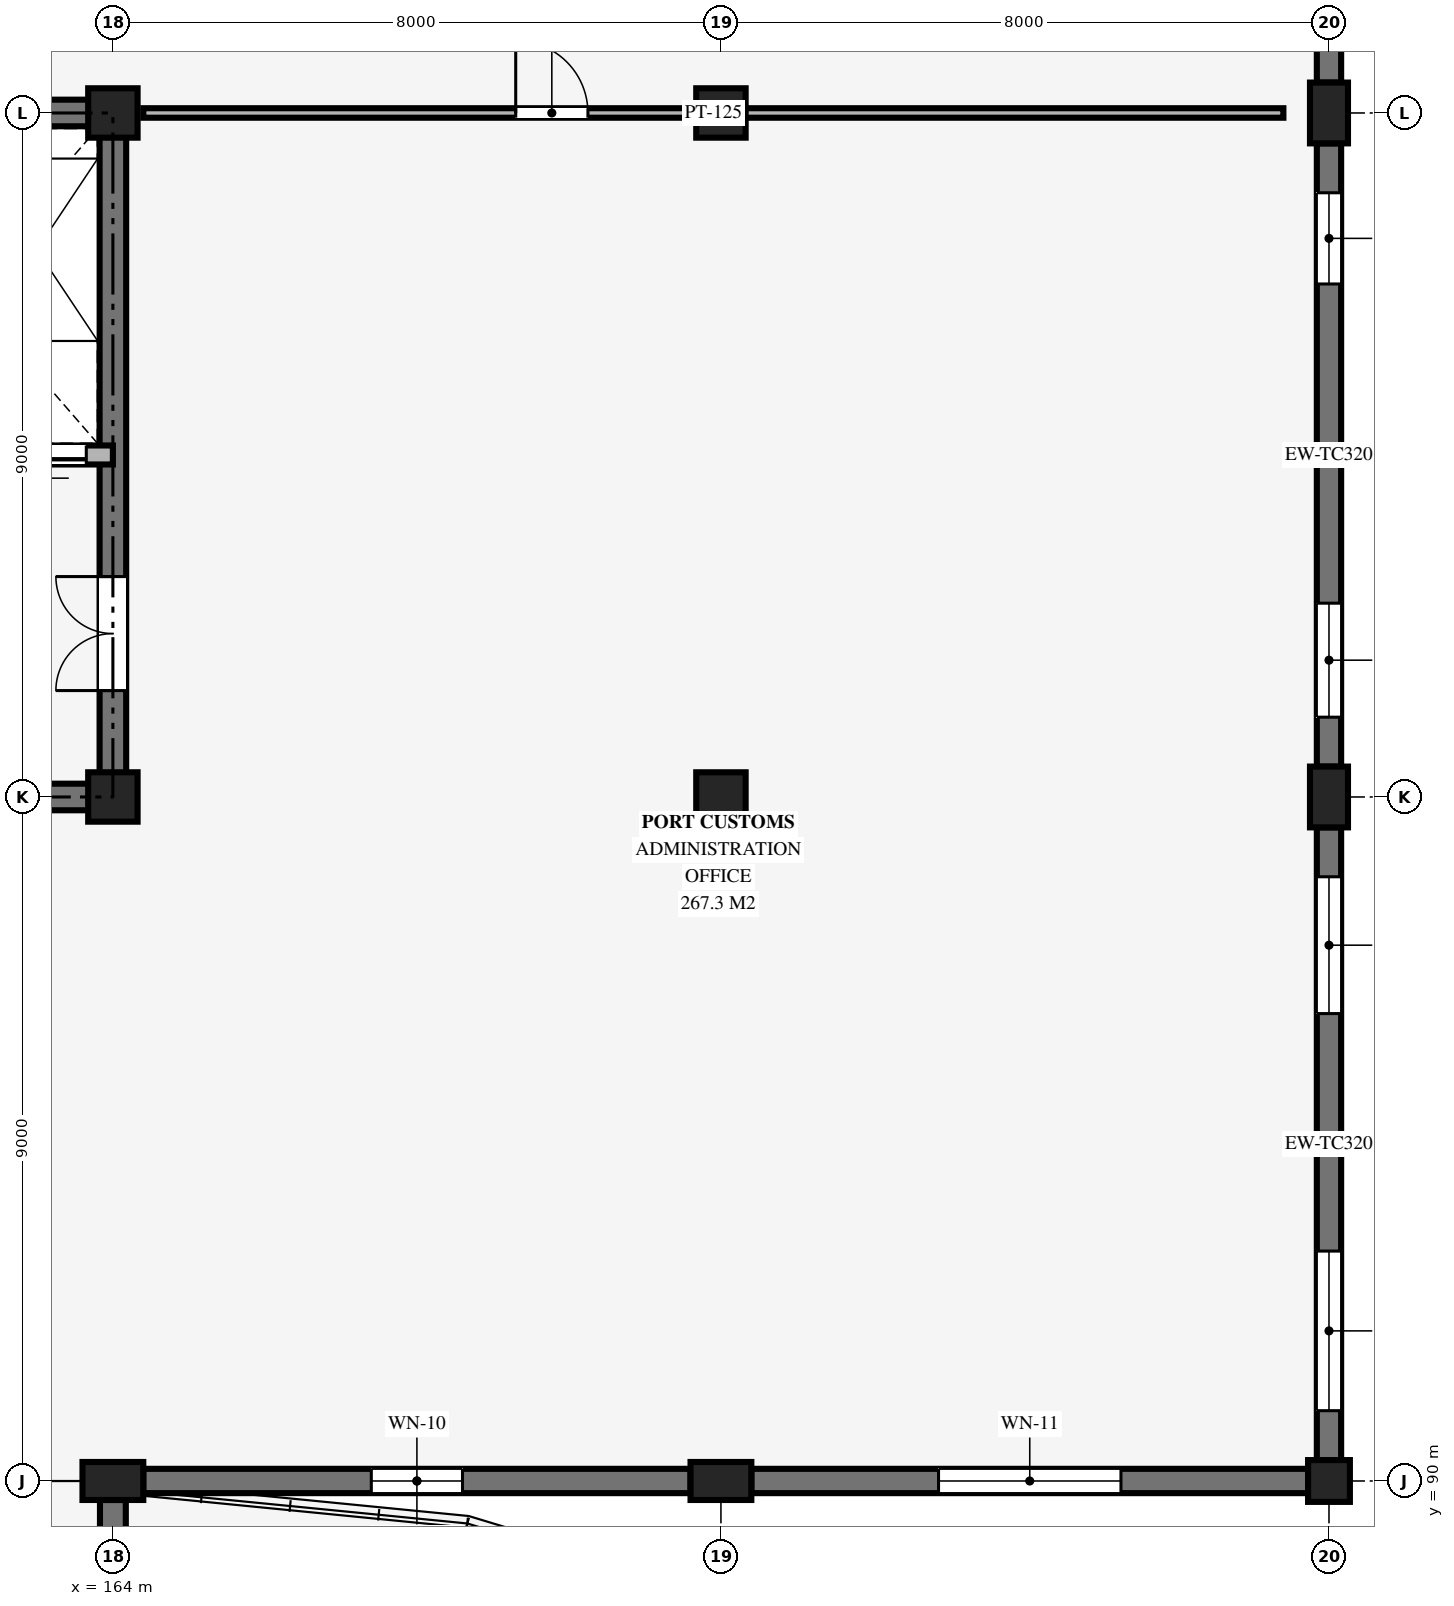
"""IFC4 building model, lengths in metres.
Left out: names, types, materials, properties, quantities, classifications, styles, units other than length and angle.
Written with IfcOpenShell. Run it as: python <this file> out.ifc"""

import sys

from ifc_helpers import new_model, si_unit, direction, frame, frame_2d, origin, origin_2d, place, context, subcontext, project, spatial, rectangle, extrude, element, fill, save


model = new_model("IFC4")
c1 = context("Model", 3, precision=1e-05, world=origin(), true_north=direction((0.0, 1.0)))
c2 = subcontext(c1, "Body", "Model", "MODEL_VIEW")
j1 = project(units=[si_unit("LENGTHUNIT", "METRE"), si_unit("PLANEANGLEUNIT", "RADIAN")], contexts=[c1])
p1 = place(None, origin())
s1 = spatial("IfcSite", under=j1, at=p1, CompositionType="ELEMENT")
p2 = place(p1, origin())
s2 = spatial("IfcBuilding", under=s1, at=p2, CompositionType="ELEMENT")
p3 = place(p2, frame((0.0, 0.0, 15.0)))
s3 = spatial("IfcBuildingStorey", under=s2, at=p3, CompositionType="ELEMENT", Elevation=15.0)
p4 = place(p3, frame((164.0, 90.0, 0.0), z_axis=(0.0, 0.0, 1.0), x_axis=(0.0, 1.0, 0.0)))
e1 = element("IfcColumn", 1, at=p4, inside=s3, PredefinedType="PILASTER", context=c2, shape_type="SweptSolid", body=[
    extrude(rectangle(XDim=0.5, YDim=0.8, at=origin_2d()), origin(), (0.0, 0.0, 1.0), 4.34),
])
for number, where, z_axis, x_axis in (
    (2, (164.0, 99.0, 0.0), (0.0, 0.0, 1.0), (1.0, 0.0, 0.0)),
    (3, (164.0, 108.0, 0.0), (0.0, 0.0, 1.0), (1.0, 0.0, 0.0)),
):
    element("IfcColumn", number, at=place(p3, frame(where, z_axis=z_axis, x_axis=x_axis)), inside=s3, PredefinedType="COLUMN", context=c2, shape_type="SweptSolid", body=[
        extrude(rectangle(XDim=0.65, YDim=0.65, at=origin_2d()), origin(), (0.0, 0.0, 1.0), 4.34),
    ])
p5 = place(p3, frame((172.0, 90.0, 0.0), z_axis=(0.0, 0.0, 1.0), x_axis=(0.0, 1.0, 0.0)))
e4 = element("IfcColumn", 4, at=p5, inside=s3, PredefinedType="PILASTER", context=c2, shape_type="SweptSolid", body=[
    extrude(rectangle(XDim=0.5, YDim=0.8, at=origin_2d()), origin(), (0.0, 0.0, 1.0), 4.34),
])
for number, where, z_axis, x_axis in (
    (5, (172.0, 99.0, 0.0), (0.0, 0.0, 1.0), (1.0, 0.0, 0.0)),
    (6, (172.0, 108.0, 0.0), (0.0, 0.0, 1.0), (1.0, 0.0, 0.0)),
):
    element("IfcColumn", number, at=place(p3, frame(where, z_axis=z_axis, x_axis=x_axis)), inside=s3, PredefinedType="COLUMN", context=c2, shape_type="SweptSolid", body=[
        extrude(rectangle(XDim=0.65, YDim=0.65, at=origin_2d()), origin(), (0.0, 0.0, 1.0), 4.34),
    ])
p6 = place(p3, frame((180.0, 90.0, 0.0), z_axis=(0.0, 0.0, 1.0), x_axis=(1.0, 0.0, 0.0)))
e7 = element("IfcColumn", 7, at=p6, inside=s3, PredefinedType="COLUMN", context=c2, shape_type="SweptSolid", body=[
    extrude(rectangle(XDim=0.55, YDim=0.55, at=origin_2d()), origin(), (0.0, 0.0, 1.0), 4.34),
])
for number, where, z_axis, x_axis in (
    (8, (180.0, 99.0, 0.0), (0.0, 0.0, 1.0), (1.0, 0.0, 0.0)),
    (9, (180.0, 108.0, 0.0), (0.0, 0.0, 1.0), (1.0, 0.0, 0.0)),
):
    element("IfcColumn", number, at=place(p3, frame(where, z_axis=z_axis, x_axis=x_axis)), inside=s3, PredefinedType="PILASTER", context=c2, shape_type="SweptSolid", body=[
        extrude(rectangle(XDim=0.5, YDim=0.8, at=origin_2d()), origin(), (0.0, 0.0, 1.0), 4.34),
    ])
p7 = place(p3, frame((164.0, 78.225, 0.0), z_axis=(0.0, 0.0, 1.0), x_axis=(0.0, 1.0, 0.0)))
e10 = element("IfcWall", 10, at=p7, inside=s3, PredefinedType="SOLIDWALL", context=c2, shape_type="SweptSolid", body=[
    extrude(rectangle(XDim=11.525, YDim=0.34, at=frame_2d((5.762, 0.0))), origin(), (0.0, 0.0, 1.0), 4.24),
])
p8 = place(p7, frame((4.813, 0.0, 0.0)))
e11 = element("IfcOpeningElement", 11, at=p8, cuts=e10, PredefinedType="OPENING", context=c2, shape_type="SweptSolid", body=[
    extrude(rectangle(XDim=1.9, YDim=2.2, at=frame_2d((0.95, 1.1))), frame((0.0, 0.18, 0.0), z_axis=(0.0, -1.0, 0.0), x_axis=(1.0, 0.0, 0.0)), (0.0, 0.0, 1.0), 0.36),
])
p9 = place(p3, frame((180.0, 90.275, 0.0), z_axis=(0.0, 0.0, 1.0), x_axis=(0.0, 1.0, 0.0)))
e12 = element("IfcWall", 12, at=p9, inside=s3, PredefinedType="SOLIDWALL", context=c2, shape_type="SweptSolid", body=[
    extrude(rectangle(XDim=8.325, YDim=0.32, at=frame_2d((4.163, 0.0))), origin(), (0.0, 0.0, 1.0), 4.24),
])
p10 = place(p9, frame((0.65, 0.0, 0.95)))
e13 = element("IfcOpeningElement", 13, at=p10, cuts=e12, PredefinedType="OPENING", context=c2, shape_type="SweptSolid", body=[
    extrude(rectangle(XDim=2.1, YDim=2.2, at=frame_2d((1.05, 1.1))), frame((0.0, 0.17, 0.0), z_axis=(0.0, -1.0, 0.0), x_axis=(1.0, 0.0, 0.0)), (0.0, 0.0, 1.0), 0.34),
])
p11 = place(p9, frame((5.875, 0.0, 0.95)))
e14 = element("IfcOpeningElement", 14, at=p11, cuts=e12, PredefinedType="OPENING", context=c2, shape_type="SweptSolid", body=[
    extrude(rectangle(XDim=1.8, YDim=2.2, at=frame_2d((0.9, 1.1))), frame((0.0, 0.17, 0.0), z_axis=(0.0, -1.0, 0.0), x_axis=(1.0, 0.0, 0.0)), (0.0, 0.0, 1.0), 0.34),
])
p12 = place(p3, frame((180.0, 99.4, 0.0), z_axis=(0.0, 0.0, 1.0), x_axis=(0.0, 1.0, 0.0)))
e15 = element("IfcWall", 15, at=p12, inside=s3, PredefinedType="SOLIDWALL", context=c2, shape_type="SweptSolid", body=[
    extrude(rectangle(XDim=8.2, YDim=0.32, at=frame_2d((4.1, 0.0))), origin(), (0.0, 0.0, 1.0), 4.24),
])
p13 = place(p12, frame((0.65, 0.0, 0.95)))
e16 = element("IfcOpeningElement", 16, at=p13, cuts=e15, PredefinedType="OPENING", context=c2, shape_type="SweptSolid", body=[
    extrude(rectangle(XDim=1.5, YDim=2.2, at=frame_2d((0.75, 1.1))), frame((0.0, 0.17, 0.0), z_axis=(0.0, -1.0, 0.0), x_axis=(1.0, 0.0, 0.0)), (0.0, 0.0, 1.0), 0.34),
])
p14 = place(p12, frame((6.35, 0.0, 0.95)))
e17 = element("IfcOpeningElement", 17, at=p14, cuts=e15, PredefinedType="OPENING", context=c2, shape_type="SweptSolid", body=[
    extrude(rectangle(XDim=1.2, YDim=2.2, at=frame_2d((0.6, 1.1))), frame((0.0, 0.17, 0.0), z_axis=(0.0, -1.0, 0.0), x_axis=(1.0, 0.0, 0.0)), (0.0, 0.0, 1.0), 0.34),
])
p15 = place(p3, frame((180.0, 108.4, 0.0), z_axis=(0.0, 0.0, 1.0), x_axis=(0.0, 1.0, 0.0)))
e18 = element("IfcWall", 18, at=p15, inside=s3, PredefinedType="SOLIDWALL", context=c2, shape_type="SweptSolid", body=[
    extrude(rectangle(XDim=8.2, YDim=0.32, at=frame_2d((4.1, 0.0))), origin(), (0.0, 0.0, 1.0), 4.24),
])
p16 = place(p15, frame((0.65, 0.0, 0.95)))
e19 = element("IfcOpeningElement", 19, at=p16, cuts=e18, PredefinedType="OPENING", context=c2, shape_type="SweptSolid", body=[
    extrude(rectangle(XDim=2.4, YDim=1.8, at=frame_2d((1.2, 0.9))), frame((0.0, 0.17, 0.0), z_axis=(0.0, -1.0, 0.0), x_axis=(1.0, 0.0, 0.0)), (0.0, 0.0, 1.0), 0.34),
])
p17 = place(p15, frame((5.45, 0.0, 0.95)))
e20 = element("IfcOpeningElement", 20, at=p17, cuts=e18, PredefinedType="OPENING", context=c2, shape_type="SweptSolid", body=[
    extrude(rectangle(XDim=2.1, YDim=1.8, at=frame_2d((1.05, 0.9))), frame((0.0, 0.17, 0.0), z_axis=(0.0, -1.0, 0.0), x_axis=(1.0, 0.0, 0.0)), (0.0, 0.0, 1.0), 0.34),
])
p18 = place(p3, frame((171.6, 90.0, 0.0), z_axis=(0.0, 0.0, 1.0), x_axis=(-1.0, 0.0, 0.0)))
e21 = element("IfcWall", 21, at=p18, inside=s3, PredefinedType="SOLIDWALL", context=c2, shape_type="SweptSolid", body=[
    extrude(rectangle(XDim=7.2, YDim=0.32, at=frame_2d((3.6, 0.0))), origin(), (0.0, 0.0, 1.0), 4.24),
])
p19 = place(p18, frame((3.0, 0.0, 1.0)))
e22 = element("IfcOpeningElement", 22, at=p19, cuts=e21, PredefinedType="OPENING", context=c2, shape_type="SweptSolid", body=[
    extrude(rectangle(XDim=1.2, YDim=1.8, at=frame_2d((0.6, 0.9))), frame((0.0, 0.17, 0.0), z_axis=(0.0, -1.0, 0.0), x_axis=(1.0, 0.0, 0.0)), (0.0, 0.0, 1.0), 0.34),
])
p20 = place(p3, frame((179.725, 90.0, 0.0), z_axis=(0.0, 0.0, 1.0), x_axis=(-1.0, 0.0, 0.0)))
e23 = element("IfcWall", 23, at=p20, inside=s3, PredefinedType="SOLIDWALL", context=c2, shape_type="SweptSolid", body=[
    extrude(rectangle(XDim=7.325, YDim=0.32, at=frame_2d((3.663, 0.0))), origin(), (0.0, 0.0, 1.0), 4.24),
])
p21 = place(p20, frame((2.462, 0.0, 1.0)))
e24 = element("IfcOpeningElement", 24, at=p21, cuts=e23, PredefinedType="OPENING", context=c2, shape_type="SweptSolid", body=[
    extrude(rectangle(XDim=2.4, YDim=1.5, at=frame_2d((1.2, 0.75))), frame((0.0, 0.17, 0.0), z_axis=(0.0, -1.0, 0.0), x_axis=(1.0, 0.0, 0.0)), (0.0, 0.0, 1.0), 0.34),
])
for number, where, z_axis, x_axis in (
    (25, (156.0, 99.0, 0.0), (0.0, 0.0, 1.0), (1.0, 0.0, 0.0)),
    (26, (156.0, 108.0, 0.0), (0.0, 0.0, 1.0), (1.0, 0.0, 0.0)),
):
    element("IfcWall", number, at=place(p3, frame(where, z_axis=z_axis, x_axis=x_axis)), inside=s3, PredefinedType="SHEAR", context=c2, shape_type="SweptSolid", body=[
        extrude(rectangle(XDim=8.0, YDim=0.35, at=frame_2d((4.0, 0.0))), origin(), (0.0, 0.0, 1.0), 4.48),
    ])
p22 = place(p3, frame((164.0, 99.0, 0.0), z_axis=(0.0, 0.0, 1.0), x_axis=(0.0, 1.0, 0.0)))
e27 = element("IfcWall", 27, at=p22, inside=s3, PredefinedType="SHEAR", context=c2, shape_type="SweptSolid", body=[
    extrude(rectangle(XDim=9.0, YDim=0.35, at=frame_2d((4.5, 0.0))), origin(), (0.0, 0.0, 1.0), 4.48),
])
p23 = place(p22, frame((1.4, 0.0, 0.0)))
e28 = element("IfcOpeningElement", 28, at=p23, cuts=e27, PredefinedType="OPENING", context=c2, shape_type="SweptSolid", body=[
    extrude(rectangle(XDim=1.5, YDim=2.2, at=frame_2d((0.75, 1.1))), frame((0.0, 0.185, 0.0), z_axis=(0.0, -1.0, 0.0), x_axis=(1.0, 0.0, 0.0)), (0.0, 0.0, 1.0), 0.37),
])
p24 = place(p3, frame((164.0, 103.5, 0.0), z_axis=(0.0, 0.0, 1.0), x_axis=(-1.0, 0.0, 0.0)))
e29 = element("IfcWall", 29, at=p24, inside=s3, PredefinedType="SOLIDWALL", context=c2, shape_type="SweptSolid", body=[
    extrude(rectangle(XDim=4.0, YDim=0.25, at=frame_2d((2.0, 0.0))), origin(), (0.0, 0.0, 1.0), 3.45),
])
p25 = place(p24, frame((0.35, 0.0, 0.0)))
e30 = element("IfcOpeningElement", 30, at=p25, cuts=e29, PredefinedType="OPENING", context=c2, shape_type="SweptSolid", body=[
    extrude(rectangle(XDim=1.3, YDim=2.25, at=frame_2d((0.65, 1.125))), frame((0.0, 0.135, 0.0), z_axis=(0.0, -1.0, 0.0), x_axis=(1.0, 0.0, 0.0)), (0.0, 0.0, 1.0), 0.27),
])
p26 = place(p24, frame((2.25, 0.0, 0.0)))
e31 = element("IfcOpeningElement", 31, at=p26, cuts=e29, PredefinedType="OPENING", context=c2, shape_type="SweptSolid", body=[
    extrude(rectangle(XDim=1.2, YDim=2.2, at=frame_2d((0.6, 1.1))), frame((0.0, 0.135, 0.0), z_axis=(0.0, -1.0, 0.0), x_axis=(1.0, 0.0, 0.0)), (0.0, 0.0, 1.0), 0.27),
])
p27 = place(p3, frame((164.4, 108.0, 0.0), z_axis=(0.0, 0.0, 1.0), x_axis=(1.0, 0.0, 0.0)))
e32 = element("IfcWall", 32, at=p27, inside=s3, PredefinedType="PARTITIONING", context=c2, shape_type="SweptSolid", body=[
    extrude(rectangle(XDim=15.0, YDim=0.125, at=frame_2d((7.5, 0.0))), origin(), (0.0, 0.0, 1.0), 3.45),
])
p28 = place(p27, frame((4.9, 0.0, 0.0)))
e33 = element("IfcOpeningElement", 33, at=p28, cuts=e32, PredefinedType="OPENING", context=c2, shape_type="SweptSolid", body=[
    extrude(rectangle(XDim=0.95, YDim=2.1, at=frame_2d((0.475, 1.05))), frame((0.0, 0.073, 0.0), z_axis=(0.0, -1.0, 0.0), x_axis=(1.0, 0.0, 0.0)), (0.0, 0.0, 1.0), 0.145),
])
p29 = place(p10, origin())
e34 = element("IfcWindow", 34, at=p29, inside=s3, PartitioningType="SINGLE_PANEL", PredefinedType="WINDOW", context=c2, shape_type="SweptSolid", body=[
    extrude(rectangle(XDim=2.1, YDim=2.2, at=frame_2d((1.05, 1.1))), frame((0.0, 0.03, 0.0), z_axis=(0.0, -1.0, 0.0), x_axis=(1.0, 0.0, 0.0)), (0.0, 0.0, 1.0), 0.06),
])
fill(e13, e34)
p30 = place(p11, origin())
e35 = element("IfcWindow", 35, at=p30, inside=s3, PartitioningType="SINGLE_PANEL", PredefinedType="WINDOW", context=c2, shape_type="SweptSolid", body=[
    extrude(rectangle(XDim=1.8, YDim=2.2, at=frame_2d((0.9, 1.1))), frame((0.0, 0.03, 0.0), z_axis=(0.0, -1.0, 0.0), x_axis=(1.0, 0.0, 0.0)), (0.0, 0.0, 1.0), 0.06),
])
fill(e14, e35)
p31 = place(p13, origin())
e36 = element("IfcWindow", 36, at=p31, inside=s3, PartitioningType="SINGLE_PANEL", PredefinedType="WINDOW", context=c2, shape_type="SweptSolid", body=[
    extrude(rectangle(XDim=1.5, YDim=2.2, at=frame_2d((0.75, 1.1))), frame((0.0, 0.03, 0.0), z_axis=(0.0, -1.0, 0.0), x_axis=(1.0, 0.0, 0.0)), (0.0, 0.0, 1.0), 0.06),
])
fill(e16, e36)
p32 = place(p14, origin())
e37 = element("IfcWindow", 37, at=p32, inside=s3, PartitioningType="SINGLE_PANEL", PredefinedType="WINDOW", context=c2, shape_type="SweptSolid", body=[
    extrude(rectangle(XDim=1.2, YDim=2.2, at=frame_2d((0.6, 1.1))), frame((0.0, 0.03, 0.0), z_axis=(0.0, -1.0, 0.0), x_axis=(1.0, 0.0, 0.0)), (0.0, 0.0, 1.0), 0.06),
])
fill(e17, e37)
p33 = place(p19, origin())
e38 = element("IfcWindow", 38, at=p33, inside=s3, PartitioningType="SINGLE_PANEL", PredefinedType="WINDOW", context=c2, shape_type="SweptSolid", body=[
    extrude(rectangle(XDim=1.2, YDim=1.8, at=frame_2d((0.6, 0.9))), frame((0.0, 0.03, 0.0), z_axis=(0.0, -1.0, 0.0), x_axis=(1.0, 0.0, 0.0)), (0.0, 0.0, 1.0), 0.06),
])
fill(e22, e38)
p34 = place(p21, origin())
e39 = element("IfcWindow", 39, at=p34, inside=s3, PartitioningType="SINGLE_PANEL", PredefinedType="WINDOW", context=c2, shape_type="SweptSolid", body=[
    extrude(rectangle(XDim=2.4, YDim=1.5, at=frame_2d((1.2, 0.75))), frame((0.0, 0.03, 0.0), z_axis=(0.0, -1.0, 0.0), x_axis=(1.0, 0.0, 0.0)), (0.0, 0.0, 1.0), 0.06),
])
fill(e24, e39)
p35 = place(p25, origin())
e40 = element("IfcDoor", 40, at=p35, inside=s3, OperationType="DOUBLE_DOOR_SLIDING", PredefinedType="USERDEFINED", context=c2, shape_type="SweptSolid", body=[
    extrude(rectangle(XDim=1.3, YDim=2.25, at=frame_2d((0.65, 1.125))), frame((0.0, 0.025, 0.0), z_axis=(0.0, -1.0, 0.0), x_axis=(1.0, 0.0, 0.0)), (0.0, 0.0, 1.0), 0.05),
])
fill(e30, e40)
p36 = place(p23, origin())
e41 = element("IfcDoor", 41, at=p36, inside=s3, OperationType="DOUBLE_DOOR_SINGLE_SWING", PredefinedType="DOOR", context=c2, shape_type="SweptSolid", body=[
    extrude(rectangle(XDim=1.5, YDim=2.2, at=frame_2d((0.75, 1.1))), frame((0.0, 0.025, 0.0), z_axis=(0.0, -1.0, 0.0), x_axis=(1.0, 0.0, 0.0)), (0.0, 0.0, 1.0), 0.05),
])
fill(e28, e41)
p37 = place(p28, origin())
e42 = element("IfcDoor", 42, at=p37, inside=s3, OperationType="SINGLE_SWING_LEFT", PredefinedType="DOOR", context=c2, shape_type="SweptSolid", body=[
    extrude(rectangle(XDim=0.95, YDim=2.1, at=frame_2d((0.475, 1.05))), frame((0.0, 0.025, 0.0), z_axis=(0.0, -1.0, 0.0), x_axis=(1.0, 0.0, 0.0)), (0.0, 0.0, 1.0), 0.05),
])
fill(e33, e42)
save(model, sys.argv[1])
